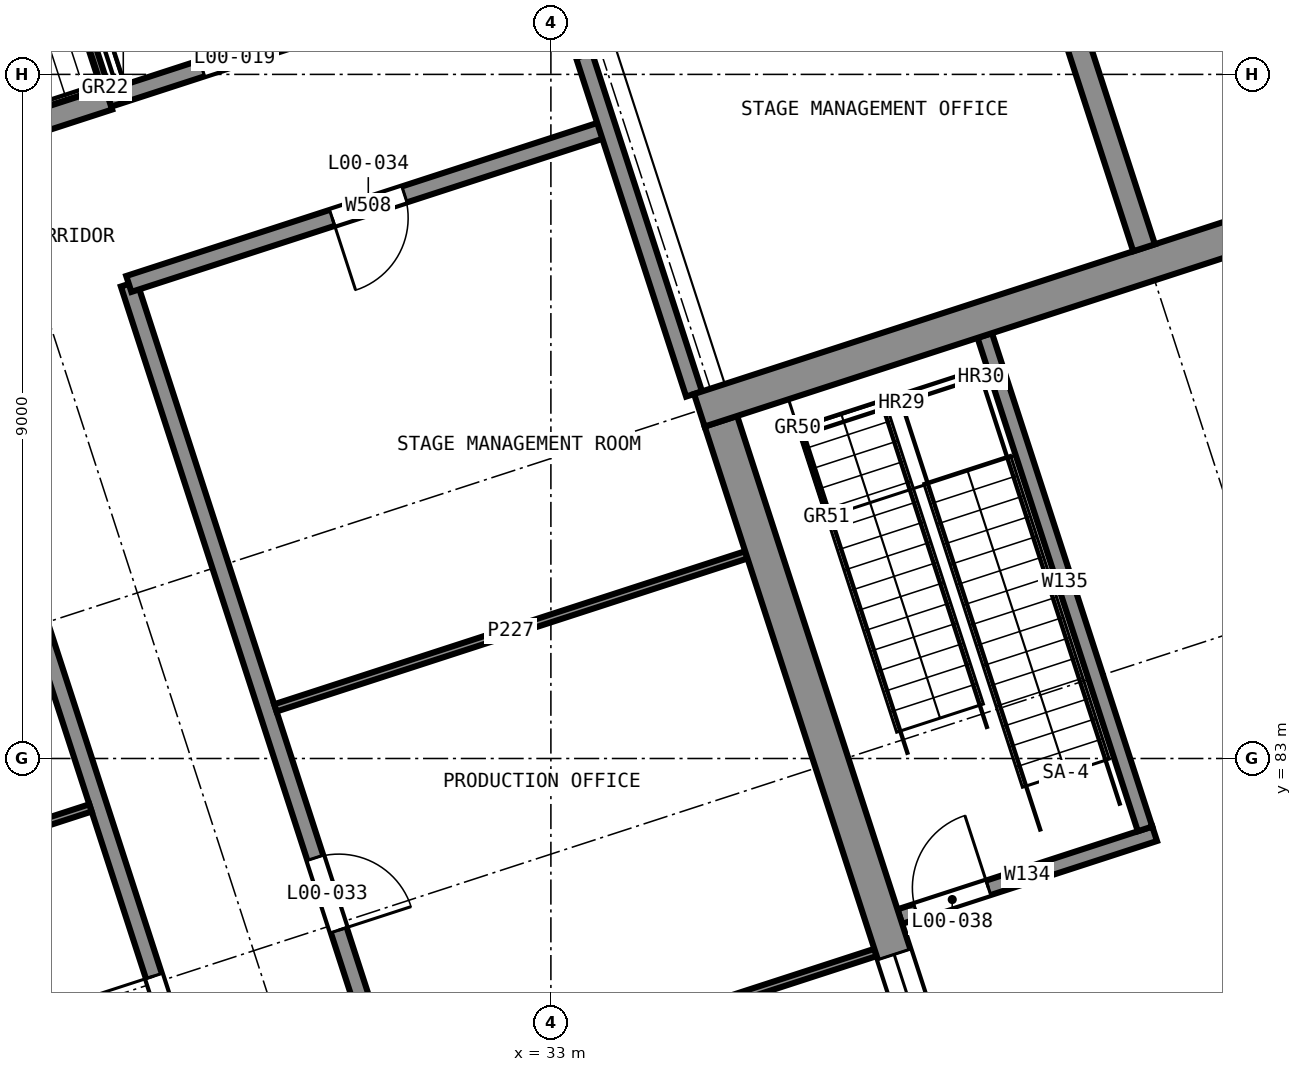
"""IFC4 building model, lengths in metres.
Left out: names, types, materials, properties, quantities, classifications, styles, units other than length and angle.
Written with IfcOpenShell. Run it as: python <this file> out.ifc"""

import sys

from ifc_helpers import new_model, si_unit, direction, frame, frame_2d, origin, place, context, subcontext, project, spatial, rectangle, extrude, element, fill, save


model = new_model("IFC4")
c1 = context("Model", 3, precision=1e-05, world=origin(), true_north=direction((0.0, 1.0)))
c2 = subcontext(c1, "Body", "Model", "MODEL_VIEW")
j1 = project(units=[si_unit("LENGTHUNIT", "METRE"), si_unit("PLANEANGLEUNIT", "RADIAN")], contexts=[c1])
p1 = place(None, origin())
s1 = spatial("IfcSite", under=j1, at=p1, CompositionType="ELEMENT")
p2 = place(p1, origin())
s2 = spatial("IfcBuilding", under=s1, at=p2, CompositionType="ELEMENT")
p3 = place(p2, origin())
s3 = spatial("IfcBuildingStorey", under=s2, at=p3, CompositionType="ELEMENT", Elevation=0.0)
p4 = place(p3, frame((41.286, 68.82, 0.0), z_axis=(0.0, 0.0, 1.0), x_axis=(-0.309008517326, 0.951059270613, 0.0)))
e1 = element("IfcWall", 1, at=p4, inside=s3, PredefinedType="SHEAR", context=c2, shape_type="SweptSolid", body=[
    extrude(rectangle(XDim=19.575, YDim=0.45, at=frame_2d((9.788, 0.0))), origin(), (0.0, 0.0, 1.0), 5.5),
])
p5 = place(p4, frame((7.4, 0.0, 0.0)))
e2 = element("IfcOpeningElement", 2, at=p5, cuts=e1, PredefinedType="OPENING", context=c2, shape_type="SweptSolid", body=[
    extrude(rectangle(XDim=4.8, YDim=4.5, at=frame_2d((2.4, 2.25))), frame((0.0, 0.235, 0.0), z_axis=(0.0, -1.0, 0.0), x_axis=(1.0, 0.0, 0.0)), (0.0, 0.0, 1.0), 0.47),
])
p6 = place(p3, frame((34.953, 87.581, 0.0), z_axis=(0.0, 0.0, 1.0), x_axis=(0.951059165148, 0.309008841924, 0.0)))
e3 = element("IfcWall", 3, at=p6, inside=s3, PredefinedType="SHEAR", context=c2, shape_type="SweptSolid", body=[
    extrude(rectangle(XDim=29.45, YDim=0.45, at=frame_2d((14.725, 0.0))), origin(), (0.0, 0.0, 1.0), 5.5),
])
p7 = place(p6, frame((12.225, 0.0, 0.0)))
e4 = element("IfcOpeningElement", 4, at=p7, cuts=e3, PredefinedType="OPENING", context=c2, shape_type="SweptSolid", body=[
    extrude(rectangle(XDim=5.0, YDim=4.5, at=frame_2d((2.5, 2.25))), frame((0.0, 0.235, 0.0), z_axis=(0.0, -1.0, 0.0), x_axis=(1.0, 0.0, 0.0)), (0.0, 0.0, 1.0), 0.47),
])
p8 = place(p3, frame((33.501, 41.003, 0.0), z_axis=(0.0, 0.0, 1.0), x_axis=(-0.309017194826, 0.951056451165, 0.0)))
e5 = element("IfcWall", 5, at=p8, inside=s3, PredefinedType="SOLIDWALL", context=c2, shape_type="SweptSolid", body=[
    extrude(rectangle(XDim=53.7, YDim=0.3, at=frame_2d((26.85, 0.0))), origin(), (0.0, 0.0, 1.0), 5.5),
])
p9 = place(p8, frame((31.55, 0.0, 0.9)))
e6 = element("IfcOpeningElement", 6, at=p9, cuts=e5, PredefinedType="OPENING", context=c2, shape_type="SweptSolid", body=[
    extrude(rectangle(XDim=3.6, YDim=2.1, at=frame_2d((1.8, 1.05))), frame((0.0, 0.16, 0.0), z_axis=(0.0, -1.0, 0.0), x_axis=(1.0, 0.0, 0.0)), (0.0, 0.0, 1.0), 0.32),
])
p10 = place(p8, frame((3.0, 0.0, 0.0)))
e7 = element("IfcOpeningElement", 7, at=p10, cuts=e5, PredefinedType="OPENING", context=c2, shape_type="SweptSolid", body=[
    extrude(rectangle(XDim=1.1, YDim=2.1, at=frame_2d((0.55, 1.05))), frame((0.0, 0.16, 0.0), z_axis=(0.0, -1.0, 0.0), x_axis=(1.0, 0.0, 0.0)), (0.0, 0.0, 1.0), 0.32),
])
p11 = place(p8, frame((12.6, 0.0, 0.0)))
e8 = element("IfcOpeningElement", 8, at=p11, cuts=e5, PredefinedType="OPENING", context=c2, shape_type="SweptSolid", body=[
    extrude(rectangle(XDim=4.5, YDim=4.5, at=frame_2d((2.25, 2.25))), frame((0.0, 0.16, 0.0), z_axis=(0.0, -1.0, 0.0), x_axis=(1.0, 0.0, 0.0)), (0.0, 0.0, 1.0), 0.32),
])
p12 = place(p8, frame((19.1, 0.0, 0.0)))
e9 = element("IfcOpeningElement", 9, at=p12, cuts=e5, PredefinedType="OPENING", context=c2, shape_type="SweptSolid", body=[
    extrude(rectangle(XDim=4.5, YDim=4.5, at=frame_2d((2.25, 2.25))), frame((0.0, 0.16, 0.0), z_axis=(0.0, -1.0, 0.0), x_axis=(1.0, 0.0, 0.0)), (0.0, 0.0, 1.0), 0.32),
])
p13 = place(p3, frame((16.718, 92.171, 0.0), z_axis=(0.0, 0.0, 1.0), x_axis=(0.951055789165, 0.309019232243, 0.0)))
e10 = element("IfcWall", 10, at=p13, inside=s3, PredefinedType="SOLIDWALL", context=c2, shape_type="SweptSolid", body=[
    extrude(rectangle(XDim=22.3, YDim=0.3, at=frame_2d((11.15, 0.0))), origin(), (0.0, 0.0, 1.0), 5.5),
])
p14 = place(p13, frame((1.65, 0.0, 0.0)))
e11 = element("IfcOpeningElement", 11, at=p14, cuts=e10, PredefinedType="OPENING", context=c2, shape_type="SweptSolid", body=[
    extrude(rectangle(XDim=1.2, YDim=2.1, at=frame_2d((0.6, 1.05))), frame((0.0, 0.16, 0.0), z_axis=(0.0, -1.0, 0.0), x_axis=(1.0, 0.0, 0.0)), (0.0, 0.0, 1.0), 0.32),
])
p15 = place(p3, frame((37.83, 98.873, 0.0), z_axis=(0.0, 0.0, 1.0), x_axis=(0.30902011435, -0.951055502548, 0.0)))
e12 = element("IfcWall", 12, at=p15, inside=s3, PredefinedType="SOLIDWALL", context=c2, shape_type="SweptSolid", body=[
    extrude(rectangle(XDim=9.625, YDim=0.3, at=frame_2d((4.812, 0.0))), origin(), (0.0, 0.0, 1.0), 5.5),
])
p16 = place(p3, frame((27.181, 91.68, 0.0), z_axis=(0.0, 0.0, 1.0), x_axis=(-0.951051301895, -0.309033042189, 0.0)))
e13 = element("IfcWall", 13, at=p16, inside=s3, PredefinedType="SOLIDWALL", context=c2, shape_type="SweptSolid", body=[
    extrude(rectangle(XDim=6.35, YDim=0.3, at=frame_2d((3.175, 0.0))), origin(), (0.0, 0.0, 1.0), 5.2),
])
p17 = place(p16, frame((4.85, 0.0, 0.0)))
e14 = element("IfcOpeningElement", 14, at=p17, cuts=e13, PredefinedType="OPENING", context=c2, shape_type="SweptSolid", body=[
    extrude(rectangle(XDim=1.0, YDim=2.1, at=frame_2d((0.5, 1.05))), frame((0.0, 0.16, 0.0), z_axis=(0.0, -1.0, 0.0), x_axis=(1.0, 0.0, 0.0)), (0.0, 0.0, 1.0), 0.32),
])
p18 = place(p3, frame((37.591, 80.92, 0.0), z_axis=(0.0, 0.0, 1.0), x_axis=(0.951052389726, 0.30902969436, 0.0)))
e15 = element("IfcWall", 15, at=p18, inside=s3, PredefinedType="SOLIDWALL", context=c2, shape_type="SweptSolid", body=[
    extrude(rectangle(XDim=3.525, YDim=0.2, at=frame_2d((1.763, 0.0))), origin(), (0.0, 0.0, 1.0), 5.5),
])
p19 = place(p18, frame((0.225, 0.0, 0.0)))
e16 = element("IfcOpeningElement", 16, at=p19, cuts=e15, PredefinedType="OPENING", context=c2, shape_type="SweptSolid", body=[
    extrude(rectangle(XDim=1.0, YDim=2.1, at=frame_2d((0.5, 1.05))), frame((0.0, 0.11, 0.0), z_axis=(0.0, -1.0, 0.0), x_axis=(1.0, 0.0, 0.0)), (0.0, 0.0, 1.0), 0.22),
])
p20 = place(p3, frame((40.817, 82.074, 0.0), z_axis=(0.0, 0.0, 1.0), x_axis=(-0.309028643499, 0.951052731186, 0.0)))
e17 = element("IfcWall", 17, at=p20, inside=s3, PredefinedType="SOLIDWALL", context=c2, shape_type="SweptSolid", body=[
    extrude(rectangle(XDim=6.825, YDim=0.2, at=frame_2d((3.413, 0.0))), origin(), (0.0, 0.0, 1.0), 5.5),
])
p21 = place(p3, frame((37.956, 48.812, 0.0), z_axis=(0.0, 0.0, 1.0), x_axis=(-0.30901736393, 0.951056396219, 0.0)))
e18 = element("IfcWall", 18, at=p21, inside=s3, PredefinedType="SOLIDWALL", context=c2, shape_type="SweptSolid", body=[
    extrude(rectangle(XDim=41.7, YDim=0.22, at=frame_2d((20.85, 0.0))), origin(), (0.0, 0.0, 1.0), 5.2),
])
p22 = place(p21, frame((2.009, 0.0, 0.0)))
e19 = element("IfcOpeningElement", 19, at=p22, cuts=e18, PredefinedType="OPENING", context=c2, shape_type="SweptSolid", body=[
    extrude(rectangle(XDim=1.0, YDim=2.1, at=frame_2d((0.5, 1.05))), frame((0.0, 0.12, 0.0), z_axis=(0.0, -1.0, 0.0), x_axis=(1.0, 0.0, 0.0)), (0.0, 0.0, 1.0), 0.24),
])
p23 = place(p21, frame((11.495, 0.0, 0.0)))
e20 = element("IfcOpeningElement", 20, at=p23, cuts=e18, PredefinedType="OPENING", context=c2, shape_type="SweptSolid", body=[
    extrude(rectangle(XDim=1.0, YDim=2.1, at=frame_2d((0.5, 1.05))), frame((0.0, 0.12, 0.0), z_axis=(0.0, -1.0, 0.0), x_axis=(1.0, 0.0, 0.0)), (0.0, 0.0, 1.0), 0.24),
])
p24 = place(p21, frame((21.7, 0.0, 0.0)))
e21 = element("IfcOpeningElement", 21, at=p24, cuts=e18, PredefinedType="OPENING", context=c2, shape_type="SweptSolid", body=[
    extrude(rectangle(XDim=1.2, YDim=2.1, at=frame_2d((0.6, 1.05))), frame((0.0, 0.12, 0.0), z_axis=(0.0, -1.0, 0.0), x_axis=(1.0, 0.0, 0.0)), (0.0, 0.0, 1.0), 0.24),
])
p25 = place(p21, frame((26.7, 0.0, 0.0)))
e22 = element("IfcOpeningElement", 22, at=p25, cuts=e18, PredefinedType="OPENING", context=c2, shape_type="SweptSolid", body=[
    extrude(rectangle(XDim=1.2, YDim=2.1, at=frame_2d((0.6, 1.05))), frame((0.0, 0.12, 0.0), z_axis=(0.0, -1.0, 0.0), x_axis=(1.0, 0.0, 0.0)), (0.0, 0.0, 1.0), 0.24),
])
p26 = place(p21, frame((31.739, 0.0, 0.0)))
e23 = element("IfcOpeningElement", 23, at=p26, cuts=e18, PredefinedType="OPENING", context=c2, shape_type="SweptSolid", body=[
    extrude(rectangle(XDim=1.2, YDim=2.1, at=frame_2d((0.6, 1.05))), frame((0.0, 0.12, 0.0), z_axis=(0.0, -1.0, 0.0), x_axis=(1.0, 0.0, 0.0)), (0.0, 0.0, 1.0), 0.24),
])
p27 = place(p3, frame((40.333, 49.584, 0.0), z_axis=(0.0, 0.0, 1.0), x_axis=(-0.309015643281, 0.951056955291, 0.0)))
e24 = element("IfcWall", 24, at=p27, inside=s3, PredefinedType="SOLIDWALL", context=c2, shape_type="SweptSolid", body=[
    extrude(rectangle(XDim=41.7, YDim=0.22, at=frame_2d((20.85, 0.0))), origin(), (0.0, 0.0, 1.0), 5.2),
])
p28 = place(p27, frame((1.9, 0.0, 0.0)))
e25 = element("IfcOpeningElement", 25, at=p28, cuts=e24, PredefinedType="OPENING", context=c2, shape_type="SweptSolid", body=[
    extrude(rectangle(XDim=1.2, YDim=2.1, at=frame_2d((0.6, 1.05))), frame((0.0, 0.12, 0.0), z_axis=(0.0, -1.0, 0.0), x_axis=(1.0, 0.0, 0.0)), (0.0, 0.0, 1.0), 0.24),
])
p29 = place(p27, frame((8.185, 0.0, 0.0)))
e26 = element("IfcOpeningElement", 26, at=p29, cuts=e24, PredefinedType="OPENING", context=c2, shape_type="SweptSolid", body=[
    extrude(rectangle(XDim=1.2, YDim=2.1, at=frame_2d((0.6, 1.05))), frame((0.0, 0.12, 0.0), z_axis=(0.0, -1.0, 0.0), x_axis=(1.0, 0.0, 0.0)), (0.0, 0.0, 1.0), 0.24),
])
p30 = place(p27, frame((16.475, 0.0, 0.0)))
e27 = element("IfcOpeningElement", 27, at=p30, cuts=e24, PredefinedType="OPENING", context=c2, shape_type="SweptSolid", body=[
    extrude(rectangle(XDim=1.0, YDim=2.1, at=frame_2d((0.5, 1.05))), frame((0.0, 0.12, 0.0), z_axis=(0.0, -1.0, 0.0), x_axis=(1.0, 0.0, 0.0)), (0.0, 0.0, 1.0), 0.24),
])
p31 = place(p27, frame((23.05, 0.0, 0.0)))
e28 = element("IfcOpeningElement", 28, at=p31, cuts=e24, PredefinedType="OPENING", context=c2, shape_type="SweptSolid", body=[
    extrude(rectangle(XDim=1.0, YDim=2.1, at=frame_2d((0.5, 1.05))), frame((0.0, 0.12, 0.0), z_axis=(0.0, -1.0, 0.0), x_axis=(1.0, 0.0, 0.0)), (0.0, 0.0, 1.0), 0.24),
])
p32 = place(p27, frame((27.3, 0.0, 0.0)))
e29 = element("IfcOpeningElement", 29, at=p32, cuts=e24, PredefinedType="OPENING", context=c2, shape_type="SweptSolid", body=[
    extrude(rectangle(XDim=1.0, YDim=2.1, at=frame_2d((0.5, 1.05))), frame((0.0, 0.12, 0.0), z_axis=(0.0, -1.0, 0.0), x_axis=(1.0, 0.0, 0.0)), (0.0, 0.0, 1.0), 0.24),
])
p33 = place(p27, frame((32.761, 0.0, 0.0)))
e30 = element("IfcOpeningElement", 30, at=p33, cuts=e24, PredefinedType="OPENING", context=c2, shape_type="SweptSolid", body=[
    extrude(rectangle(XDim=1.0, YDim=2.1, at=frame_2d((0.5, 1.05))), frame((0.0, 0.12, 0.0), z_axis=(0.0, -1.0, 0.0), x_axis=(1.0, 0.0, 0.0)), (0.0, 0.0, 1.0), 0.24),
])
p34 = place(p3, frame((27.447, 89.243, 0.0), z_axis=(0.0, 0.0, 1.0), x_axis=(0.951062229373, 0.308999410776, 0.0)))
e31 = element("IfcWall", 31, at=p34, inside=s3, PredefinedType="SOLIDWALL", context=c2, shape_type="SweptSolid", body=[
    extrude(rectangle(XDim=6.625, YDim=0.22, at=frame_2d((3.312, 0.0))), origin(), (0.0, 0.0, 1.0), 5.2),
])
p35 = place(p34, frame((2.812, 0.0, 0.0)))
e32 = element("IfcOpeningElement", 32, at=p35, cuts=e31, PredefinedType="OPENING", context=c2, shape_type="SweptSolid", body=[
    extrude(rectangle(XDim=1.0, YDim=2.1, at=frame_2d((0.5, 1.05))), frame((0.0, 0.12, 0.0), z_axis=(0.0, -1.0, 0.0), x_axis=(1.0, 0.0, 0.0)), (0.0, 0.0, 1.0), 0.24),
])
p36 = place(p3, frame((27.181, 91.68, 0.0), z_axis=(0.0, 0.0, 1.0), x_axis=(0.951063356831, 0.308995940577, 0.0)))
e33 = element("IfcWall", 33, at=p36, inside=s3, PredefinedType="SOLIDWALL", context=c2, shape_type="SweptSolid", body=[
    extrude(rectangle(XDim=6.125, YDim=0.22, at=frame_2d((3.062, 0.0))), origin(), (0.0, 0.0, 1.0), 5.2),
])
p37 = place(p36, frame((1.293, 0.0, 0.0)))
e34 = element("IfcOpeningElement", 34, at=p37, cuts=e33, PredefinedType="OPENING", context=c2, shape_type="SweptSolid", body=[
    extrude(rectangle(XDim=0.9, YDim=2.1, at=frame_2d((0.45, 1.05))), frame((0.0, 0.12, 0.0), z_axis=(0.0, -1.0, 0.0), x_axis=(1.0, 0.0, 0.0)), (0.0, 0.0, 1.0), 0.24),
])
p38 = place(p36, frame((4.357, 0.0, 0.0)))
e35 = element("IfcOpeningElement", 35, at=p38, cuts=e33, PredefinedType="OPENING", context=c2, shape_type="SweptSolid", body=[
    extrude(rectangle(XDim=0.9, YDim=2.1, at=frame_2d((0.45, 1.05))), frame((0.0, 0.12, 0.0), z_axis=(0.0, -1.0, 0.0), x_axis=(1.0, 0.0, 0.0)), (0.0, 0.0, 1.0), 0.24),
])
p39 = place(p3, frame((34.884, 87.795, 0.0), z_axis=(0.0, 0.0, 1.0), x_axis=(-0.309027569133, 0.951053080283, 0.0)))
e36 = element("IfcWall", 36, at=p39, inside=s3, PredefinedType="SOLIDWALL", context=c2, shape_type="SweptSolid", body=[
    extrude(rectangle(XDim=9.625, YDim=0.22, at=frame_2d((4.812, 0.0))), origin(), (0.0, 0.0, 1.0), 5.2),
])
p40 = place(p39, frame((4.665, 0.0, 0.0)))
e37 = element("IfcOpeningElement", 37, at=p40, cuts=e36, PredefinedType="OPENING", context=c2, shape_type="SweptSolid", body=[
    extrude(rectangle(XDim=0.9, YDim=2.1, at=frame_2d((0.45, 1.05))), frame((0.0, 0.12, 0.0), z_axis=(0.0, -1.0, 0.0), x_axis=(1.0, 0.0, 0.0)), (0.0, 0.0, 1.0), 0.24),
])
p41 = place(p3, frame((31.075, 78.435, 0.0), z_axis=(0.0, 0.0, 1.0), x_axis=(0.951058024796, 0.309012351648, 0.0)))
e38 = element("IfcWall", 38, at=p41, inside=s3, PredefinedType="PARTITIONING", context=c2, shape_type="SweptSolid", body=[
    extrude(rectangle(XDim=6.515, YDim=0.1, at=frame_2d((3.257, 0.0))), origin(), (0.0, 0.0, 1.0), 5.2),
])
p42 = place(p3, frame((20.865, 80.375, 0.0), z_axis=(0.0, 0.0, 1.0), x_axis=(0.951055405517, 0.309020412977, 0.0)))
e39 = element("IfcWall", 39, at=p42, inside=s3, PredefinedType="PARTITIONING", context=c2, shape_type="SweptSolid", body=[
    extrude(rectangle(XDim=6.39, YDim=0.1, at=frame_2d((3.195, 0.0))), origin(), (0.0, 0.0, 1.0), 5.2),
])
p43 = place(p3, frame((29.375, 83.666, 0.0), z_axis=(0.0, 0.0, 1.0), x_axis=(0.951061602966, 0.309001338773, 0.0)))
e40 = element("IfcWall", 40, at=p43, inside=s3, PredefinedType="PARTITIONING", context=c2, shape_type="SweptSolid", body=[
    extrude(rectangle(XDim=6.515, YDim=0.1, at=frame_2d((3.258, 0.0))), origin(), (0.0, 0.0, 1.0), 5.2),
])
p44 = place(p3, frame((27.135, 91.823, 0.0), z_axis=(0.0, 0.0, 1.0), x_axis=(-0.308980533303, 0.951068362443, 0.0)))
e41 = element("IfcWall", 41, at=p44, inside=s3, PredefinedType="PARTITIONING", context=c2, shape_type="SweptSolid", body=[
    extrude(rectangle(XDim=3.4, YDim=0.1, at=frame_2d((1.7, 0.0))), origin(), (0.0, 0.0, 1.0), 5.2),
])
p45 = place(p37, origin())
e42 = element("IfcDoor", 42, at=p45, inside=s3, OperationType="SINGLE_SWING_RIGHT", PredefinedType="DOOR", context=c2, shape_type="SweptSolid", body=[
    extrude(rectangle(XDim=0.9, YDim=2.1, at=frame_2d((0.45, 1.05))), frame((0.0, 0.025, 0.0), z_axis=(0.0, -1.0, 0.0), x_axis=(1.0, 0.0, 0.0)), (0.0, 0.0, 1.0), 0.05),
])
fill(e34, e42)
p46 = place(p40, frame((0.9, 0.0, 0.0), z_axis=(0.0, 0.0, 1.0), x_axis=(-1.0, 0.0, 0.0)))
e43 = element("IfcDoor", 43, at=p46, inside=s3, OperationType="SINGLE_SWING_LEFT", PredefinedType="DOOR", context=c2, shape_type="SweptSolid", body=[
    extrude(rectangle(XDim=0.9, YDim=2.1, at=frame_2d((0.45, 1.05))), frame((0.0, 0.025, 0.0), z_axis=(0.0, -1.0, 0.0), x_axis=(1.0, 0.0, 0.0)), (0.0, 0.0, 1.0), 0.05),
])
fill(e37, e43)
p47 = place(p26, origin())
e44 = element("IfcDoor", 44, at=p47, inside=s3, OperationType="SINGLE_SWING_LEFT", PredefinedType="DOOR", context=c2, shape_type="SweptSolid", body=[
    extrude(rectangle(XDim=1.2, YDim=2.1, at=frame_2d((0.6, 1.05))), frame((0.0, 0.025, 0.0), z_axis=(0.0, -1.0, 0.0), x_axis=(1.0, 0.0, 0.0)), (0.0, 0.0, 1.0), 0.05),
])
fill(e23, e44)
p48 = place(p33, frame((1.0, 0.0, 0.0), z_axis=(0.0, 0.0, 1.0), x_axis=(-1.0, 0.0, 0.0)))
e45 = element("IfcDoor", 45, at=p48, inside=s3, OperationType="SINGLE_SWING_LEFT", PredefinedType="DOOR", context=c2, shape_type="SweptSolid", body=[
    extrude(rectangle(XDim=1.0, YDim=2.1, at=frame_2d((0.5, 1.05))), frame((0.0, 0.025, 0.0), z_axis=(0.0, -1.0, 0.0), x_axis=(1.0, 0.0, 0.0)), (0.0, 0.0, 1.0), 0.05),
])
fill(e30, e45)
p49 = place(p35, frame((1.0, 0.0, 0.0), z_axis=(0.0, 0.0, 1.0), x_axis=(-1.0, 0.0, 0.0)))
e46 = element("IfcDoor", 46, at=p49, inside=s3, OperationType="SINGLE_SWING_LEFT", PredefinedType="DOOR", context=c2, shape_type="SweptSolid", body=[
    extrude(rectangle(XDim=1.0, YDim=2.1, at=frame_2d((0.5, 1.05))), frame((0.0, 0.025, 0.0), z_axis=(0.0, -1.0, 0.0), x_axis=(1.0, 0.0, 0.0)), (0.0, 0.0, 1.0), 0.05),
])
fill(e32, e46)
p50 = place(p19, origin())
e47 = element("IfcDoor", 47, at=p50, inside=s3, OperationType="SINGLE_SWING_LEFT", PredefinedType="DOOR", context=c2, shape_type="SweptSolid", body=[
    extrude(rectangle(XDim=1.0, YDim=2.1, at=frame_2d((0.5, 1.05))), frame((0.0, 0.025, 0.0), z_axis=(0.0, -1.0, 0.0), x_axis=(1.0, 0.0, 0.0)), (0.0, 0.0, 1.0), 0.05),
])
fill(e16, e47)
p51 = place(p5, origin())
e48 = element("IfcDoor", 48, at=p51, inside=s3, OperationType="SLIDING_TO_LEFT", PredefinedType="DOOR", context=c2, shape_type="SweptSolid", body=[
    extrude(rectangle(XDim=4.8, YDim=4.5, at=frame_2d((2.4, 2.25))), frame((0.0, 0.025, 0.0), z_axis=(0.0, -1.0, 0.0), x_axis=(1.0, 0.0, 0.0)), (0.0, 0.0, 1.0), 0.05),
])
fill(e2, e48)
save(model, sys.argv[1])
